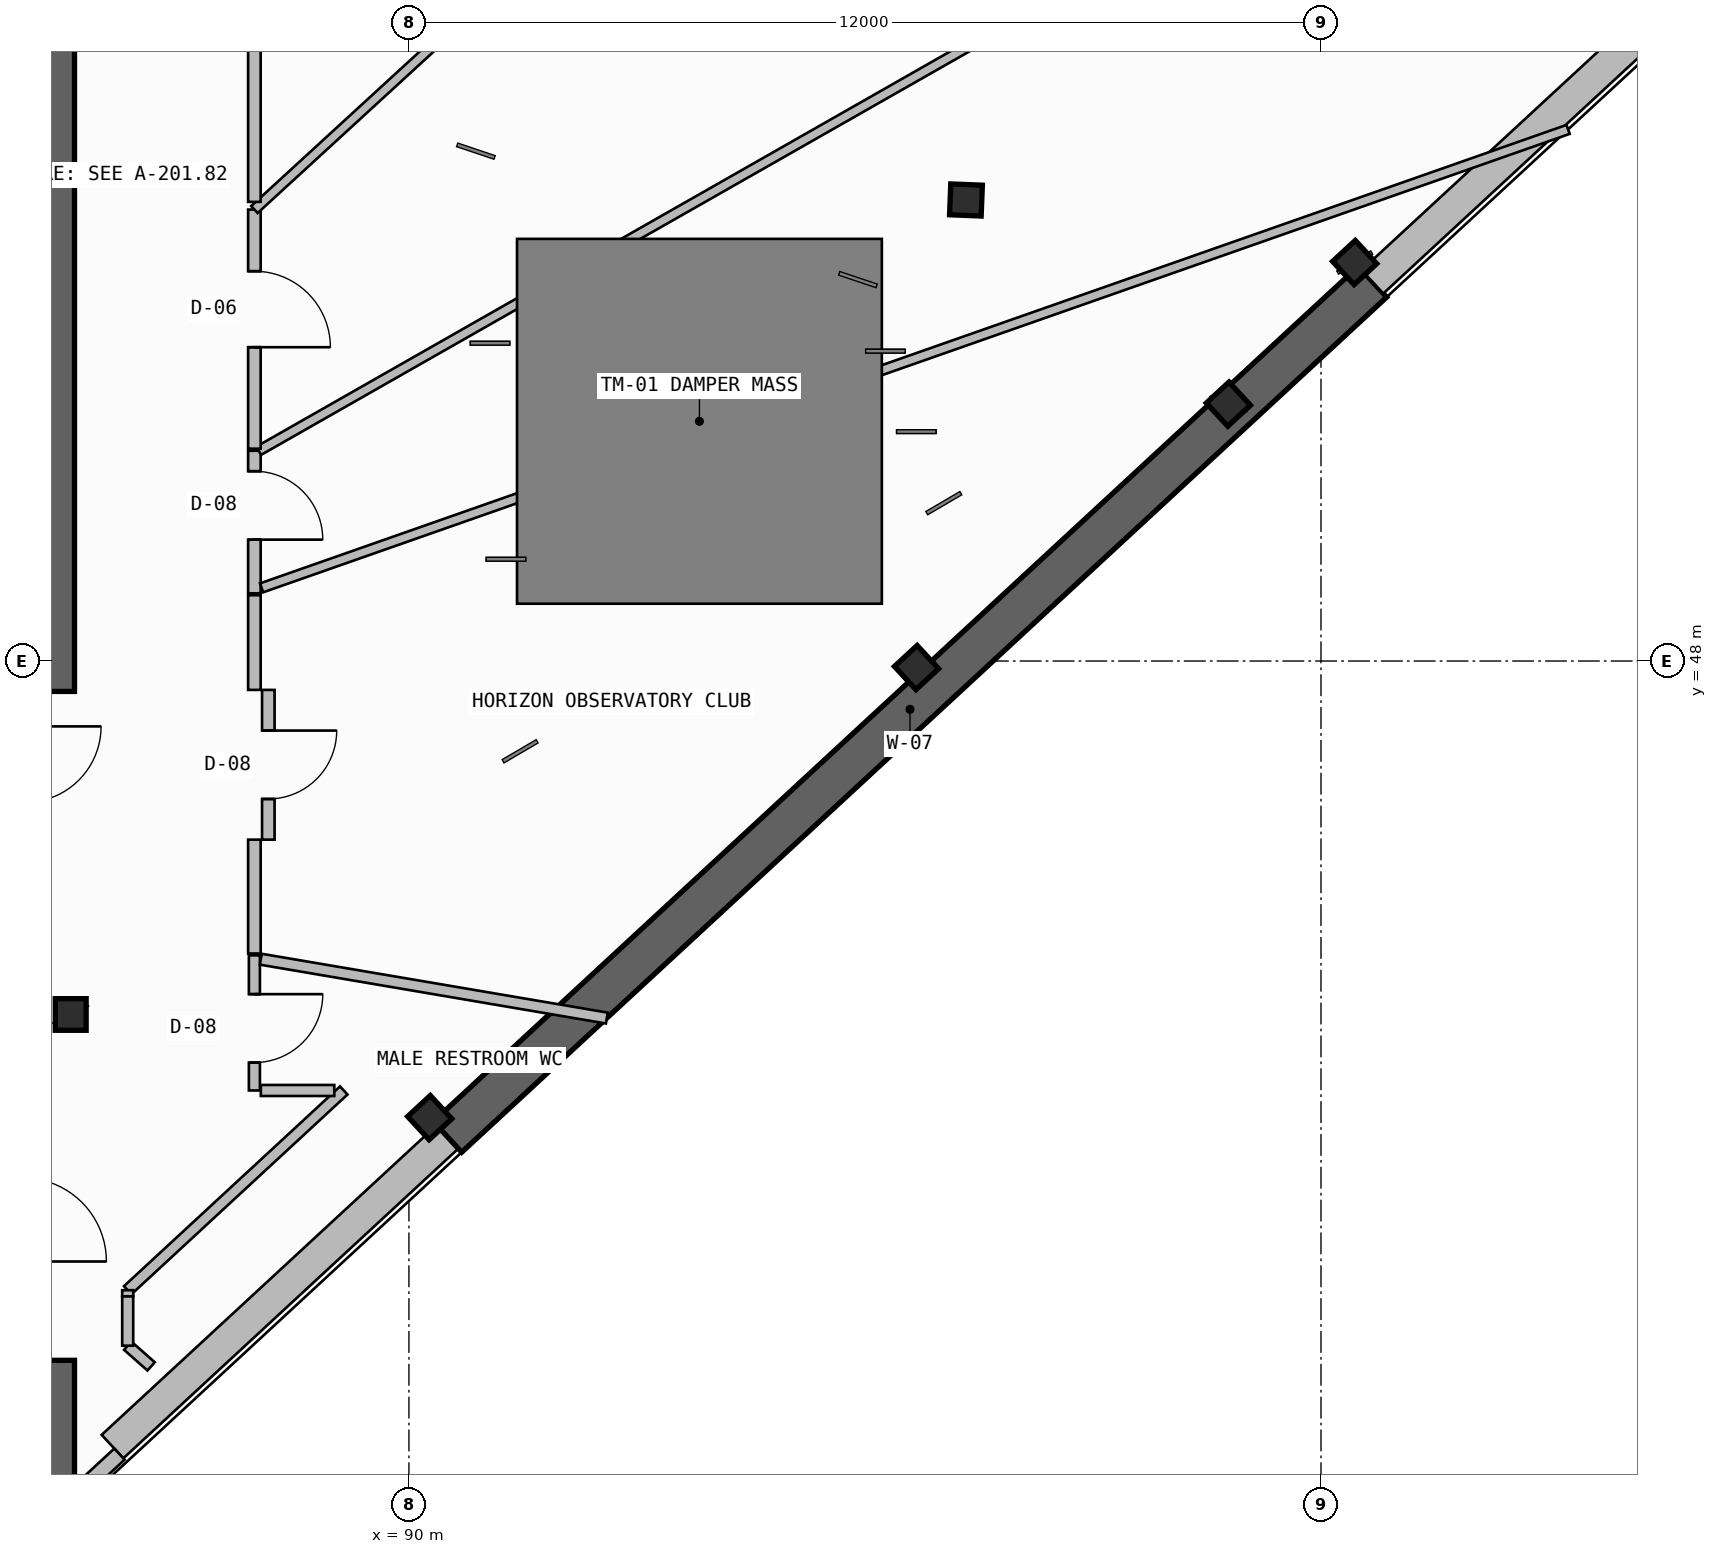
"""IFC4 building model, lengths in metres.
Left out: names, types, materials, properties, quantities, classifications, styles, units other than length and angle.
Written with IfcOpenShell. Run it as: python <this file> out.ifc"""

import sys

from ifc_helpers import new_model, si_unit, direction, frame, frame_2d, origin, origin_2d, place, context, subcontext, project, spatial, rectangle, i_section, extrude, element, fill, save


model = new_model("IFC4")
c1 = context("Model", 3, precision=1e-05, world=origin(), true_north=direction((0.0, 1.0)))
c2 = subcontext(c1, "Body", "Model", "MODEL_VIEW")
j1 = project(units=[si_unit("LENGTHUNIT", "METRE"), si_unit("PLANEANGLEUNIT", "RADIAN")], contexts=[c1])
p1 = place(None, origin())
s1 = spatial("IfcSite", under=j1, at=p1, CompositionType="ELEMENT")
p2 = place(p1, origin())
s2 = spatial("IfcBuilding", under=s1, at=p2, CompositionType="ELEMENT")
p3 = place(p2, frame((0.0, 0.0, 292.42)))
s3 = spatial("IfcBuildingStorey", under=s2, at=p3, CompositionType="ELEMENT", Elevation=292.42)
p4 = place(p3, frame((85.3, 35.5, -0.26), z_axis=(0.0, 0.0, 1.0), x_axis=(0.0, 1.0, 0.0)))
e1 = element("IfcWall", 1, at=p4, inside=s3, PredefinedType="SHEAR", context=c2, shape_type="SweptSolid", body=[
    extrude(rectangle(XDim=3.3, YDim=0.6, at=frame_2d((1.65, 0.0))), origin(), (0.0, 0.0, 1.0), 5.82),
])
p5 = place(p3, frame((85.3, 47.6, -0.26), z_axis=(0.0, 0.0, 1.0), x_axis=(0.0, 1.0, 0.0)))
e2 = element("IfcWall", 2, at=p5, inside=s3, PredefinedType="SHEAR", context=c2, shape_type="SweptSolid", body=[
    extrude(rectangle(XDim=8.45, YDim=0.6, at=frame_2d((4.225, 0.0))), origin(), (0.0, 0.0, 1.0), 5.82),
])
for number, where, z_axis, x_axis in (
    (3, (85.55, 43.35, 0.0), (0.0, 0.0, 1.0), (1.0, 0.0, 0.0)),
    (4, (90.273, 41.993, 0.0), (0.0, 0.0, 1.0), (0.734, 0.679, 0.0)),
    (5, (96.679, 47.914, 0.0), (0.0, 0.0, 1.0), (0.734, 0.679, 0.0)),
    (6, (102.443, 53.242, 0.0), (0.0, 0.0, 1.0), (0.734, 0.679, 0.0)),
    (7, (100.782, 51.38, 0.0), (0.0, 0.0, 1.0), (0.734, 0.679, 0.0)),
    (8, (97.329, 54.065, 0.0), (0.0, 0.0, 1.0), (0.039, 0.999, 0.0)),
):
    element("IfcColumn", number, at=place(p3, frame(where, z_axis=z_axis, x_axis=x_axis)), inside=s3, PredefinedType="COLUMN", context=c2, shape_type="SweptSolid", body=[
        extrude(i_section(OverallWidth=0.406, OverallDepth=0.416, WebThickness=0.03, FlangeThickness=0.048, FilletRadius=0.015, at=origin_2d()), origin(), (0.0, 0.0, 1.0), 5.76),
    ])
p6 = place(p3, frame((86.1, 37.665, 0.0), z_axis=(0.0, 0.0, 1.0), x_axis=(0.734321413343, 0.678801931277, 0.0)))
e9 = element("IfcWall", 9, at=p6, inside=s3, PredefinedType="SOLIDWALL", context=c2, shape_type="SweptSolid", body=[
    extrude(rectangle(XDim=6.002, YDim=0.42, at=frame_2d((3.001, 0.0))), origin(), (0.0, 0.0, 1.0), 4.545),
])
p7 = place(p3, frame((90.508, 41.74, -0.26), z_axis=(0.0, 0.0, 1.0), x_axis=(0.734315848115, 0.678807951638, 0.0)))
e10 = element("IfcWall", 10, at=p7, inside=s3, PredefinedType="SHEAR", context=c2, shape_type="SweptSolid", body=[
    extrude(rectangle(XDim=16.573, YDim=0.55, at=frame_2d((8.286, 0.0))), origin(), (0.0, 0.0, 1.0), 5.82),
])
p8 = place(p3, frame((102.677, 52.989, 0.0), z_axis=(0.0, 0.0, 1.0), x_axis=(0.734331107219, 0.678791444386, 0.0)))
e11 = element("IfcWall", 11, at=p8, inside=s3, PredefinedType="SOLIDWALL", context=c2, shape_type="SweptSolid", body=[
    extrude(rectangle(XDim=12.211, YDim=0.42, at=frame_2d((6.106, 0.0))), origin(), (0.0, 0.0, 1.0), 2.195),
])
p9 = place(p3, frame((86.192, 37.566, 0.0), z_axis=(0.0, 0.0, 1.0), x_axis=(-0.734346728958, -0.678774544064, 0.0)))
e12 = element("IfcWall", 12, at=p9, inside=s3, PredefinedType="PARAPET", context=c2, shape_type="SweptSolid", body=[
    extrude(rectangle(XDim=0.615, YDim=0.2, at=frame_2d((0.308, 0.0))), origin(), (0.0, 0.0, 1.0), 1.15),
])
p10 = place(p3, frame((86.3, 39.722, 0.0), z_axis=(0.0, 0.0, 1.0), x_axis=(0.734312402088, 0.678811679436, 0.0)))
e13 = element("IfcWall", 13, at=p10, inside=s3, PredefinedType="PARTITIONING", context=c2, shape_type="SweptSolid", body=[
    extrude(rectangle(XDim=3.871, YDim=0.145, at=frame_2d((1.936, 0.0))), origin(), (0.0, 0.0, 1.0), 5.045),
])
p11 = place(p3, frame((87.967, 42.35, 0.0), z_axis=(0.0, 0.0, 1.0), x_axis=(0.0, 1.0, 0.0)))
e14 = element("IfcWall", 14, at=p11, inside=s3, PredefinedType="PARTITIONING", context=c2, shape_type="SweptSolid", body=[
    extrude(rectangle(XDim=1.778, YDim=0.145, at=frame_2d((0.889, 0.0))), origin(), (0.0, 0.0, 1.0), 5.045),
])
p12 = place(p11, frame((0.367, 0.0, 0.0)))
e15 = element("IfcOpeningElement", 15, at=p12, cuts=e14, PredefinedType="OPENING", context=c2, shape_type="SweptSolid", body=[
    extrude(rectangle(XDim=0.9, YDim=2.1, at=frame_2d((0.45, 1.05))), frame((0.0, 0.083, 0.0), z_axis=(0.0, -1.0, 0.0), x_axis=(1.0, 0.0, 0.0)), (0.0, 0.0, 1.0), 0.165),
])
p13 = place(p3, frame((89.018, 42.35, 0.0), z_axis=(0.0, 0.0, 1.0), x_axis=(-1.0, 0.0, 0.0)))
e16 = element("IfcWall", 16, at=p13, inside=s3, PredefinedType="PARTITIONING", context=c2, shape_type="SweptSolid", body=[
    extrude(rectangle(XDim=0.967, YDim=0.145, at=frame_2d((0.483, 0.0))), origin(), (0.0, 0.0, 1.0), 5.045),
])
p14 = place(p3, frame((86.3, 39.641, 0.0), z_axis=(0.0, 0.0, 1.0), x_axis=(0.0, 1.0, 0.0)))
e17 = element("IfcWall", 17, at=p14, inside=s3, PredefinedType="PARTITIONING", context=c2, shape_type="SweptSolid", body=[
    extrude(rectangle(XDim=0.082, YDim=0.145, at=frame_2d((0.041, 0.0))), origin(), (0.0, 0.0, 1.0), 5.56),
])
p15 = place(p3, frame((88.051, 44.077, 0.0), z_axis=(0.0, 0.0, 1.0), x_axis=(0.985838283524, -0.167698773815, 0.0)))
e18 = element("IfcWall", 18, at=p15, inside=s3, PredefinedType="PARTITIONING", context=c2, shape_type="SweptSolid", body=[
    extrude(rectangle(XDim=4.618, YDim=0.145, at=frame_2d((2.309, 0.0))), origin(), (0.0, 0.0, 1.0), 4.545),
])
p16 = place(p3, frame((87.967, 48.891, 0.0), z_axis=(0.0, 0.0, 1.0), x_axis=(0.0, 1.0, 0.0)))
e19 = element("IfcWall", 19, at=p16, inside=s3, PredefinedType="PARTITIONING", context=c2, shape_type="SweptSolid", body=[
    extrude(rectangle(XDim=1.875, YDim=0.165, at=frame_2d((0.938, 0.0))), origin(), (0.0, 0.0, 1.0), 5.56),
])
p17 = place(p16, frame((0.706, 0.0, 0.0)))
e20 = element("IfcOpeningElement", 20, at=p17, cuts=e19, PredefinedType="OPENING", context=c2, shape_type="SweptSolid", body=[
    extrude(rectangle(XDim=0.9, YDim=2.1, at=frame_2d((0.45, 1.05))), frame((0.0, 0.093, 0.0), z_axis=(0.0, -1.0, 0.0), x_axis=(1.0, 0.0, 0.0)), (0.0, 0.0, 1.0), 0.185),
])
p18 = place(p3, frame((105.252, 54.994, 0.0), z_axis=(0.0, 0.0, 1.0), x_axis=(-0.943604021882, -0.33107619952, 0.0)))
e21 = element("IfcWall", 21, at=p18, inside=s3, PredefinedType="PARTITIONING", context=c2, shape_type="SweptSolid", body=[
    extrude(rectangle(XDim=18.218, YDim=0.125, at=frame_2d((9.109, 0.0))), origin(), (0.0, 0.0, 1.0), 2.195),
])
p19 = place(p3, frame((88.024, 50.766, 0.0), z_axis=(0.0, 0.0, 1.0), x_axis=(0.868931723382, 0.494931975226, 0.0)))
e22 = element("IfcWall", 22, at=p19, inside=s3, PredefinedType="PARTITIONING", context=c2, shape_type="SweptSolid", body=[
    extrude(rectangle(XDim=27.262, YDim=0.125, at=frame_2d((13.631, 0.0))), origin(), (0.0, 0.0, 1.0), 2.195),
])
p20 = place(p3, frame((88.15, 45.65, 0.0), z_axis=(0.0, 0.0, 1.0), x_axis=(0.0, 1.0, 0.0)))
e23 = element("IfcWall", 23, at=p20, inside=s3, PredefinedType="PARTITIONING", context=c2, shape_type="SweptSolid", body=[
    extrude(rectangle(XDim=1.97, YDim=0.165, at=frame_2d((0.985, 0.0))), origin(), (0.0, 0.0, 1.0), 5.56),
])
p21 = place(p20, frame((0.535, 0.0, 0.0)))
e24 = element("IfcOpeningElement", 24, at=p21, cuts=e23, PredefinedType="OPENING", context=c2, shape_type="SweptSolid", body=[
    extrude(rectangle(XDim=0.9, YDim=2.1, at=frame_2d((0.45, 1.05))), frame((0.0, 0.093, 0.0), z_axis=(0.0, -1.0, 0.0), x_axis=(1.0, 0.0, 0.0)), (0.0, 0.0, 1.0), 0.185),
])
p22 = place(p3, frame((87.967, 44.152, 0.0), z_axis=(0.0, 0.0, 1.0), x_axis=(0.0, 1.0, 0.0)))
e25 = element("IfcWall", 25, at=p22, inside=s3, PredefinedType="PARTITIONING", context=c2, shape_type="SweptSolid", body=[
    extrude(rectangle(XDim=1.498, YDim=0.165, at=frame_2d((0.749, 0.0))), origin(), (0.0, 0.0, 1.0), 2.195),
])
p23 = place(p3, frame((87.967, 47.62, 0.0), z_axis=(0.0, 0.0, 1.0), x_axis=(0.0, 1.0, 0.0)))
e26 = element("IfcWall", 26, at=p23, inside=s3, PredefinedType="PARTITIONING", context=c2, shape_type="SweptSolid", body=[
    extrude(rectangle(XDim=1.246, YDim=0.165, at=frame_2d((0.623, 0.0))), origin(), (0.0, 0.0, 1.0), 5.56),
])
p24 = place(p3, frame((87.967, 50.793, 0.0), z_axis=(0.0, 0.0, 1.0), x_axis=(0.0, 1.0, 0.0)))
e27 = element("IfcWall", 27, at=p24, inside=s3, PredefinedType="PARTITIONING", context=c2, shape_type="SweptSolid", body=[
    extrude(rectangle(XDim=3.146, YDim=0.165, at=frame_2d((1.573, 0.0))), origin(), (0.0, 0.0, 1.0), 5.56),
])
p25 = place(p24, frame((1.335, 0.0, 0.0)))
e28 = element("IfcOpeningElement", 28, at=p25, cuts=e27, PredefinedType="OPENING", context=c2, shape_type="SweptSolid", body=[
    extrude(rectangle(XDim=1.0, YDim=2.2, at=frame_2d((0.5, 1.1))), frame((0.0, 0.093, 0.0), z_axis=(0.0, -1.0, 0.0), x_axis=(1.0, 0.0, 0.0)), (0.0, 0.0, 1.0), 0.185),
])
p26 = place(p3, frame((87.967, 53.939, 0.0), z_axis=(0.0, 0.0, 1.0), x_axis=(0.737044386096, 0.675844340751, 0.0)))
e29 = element("IfcWall", 29, at=p26, inside=s3, PredefinedType="PARTITIONING", context=c2, shape_type="SweptSolid", body=[
    extrude(rectangle(XDim=14.959, YDim=0.125, at=frame_2d((7.48, 0.0))), origin(), (0.0, 0.0, 1.0), 2.195),
])
p27 = place(p3, frame((87.967, 54.041, 0.0), z_axis=(0.0, 0.0, 1.0), x_axis=(0.0, 1.0, 0.0)))
e30 = element("IfcWall", 30, at=p27, inside=s3, PredefinedType="PARTITIONING", context=c2, shape_type="SweptSolid", body=[
    extrude(rectangle(XDim=4.826, YDim=0.165, at=frame_2d((2.413, 0.0))), origin(), (0.0, 0.0, 1.0), 2.195),
])
p28 = place(p27, frame((2.492, 0.0, 0.0)))
e31 = element("IfcOpeningElement", 31, at=p28, cuts=e30, PredefinedType="OPENING", context=c2, shape_type="SweptSolid", body=[
    extrude(rectangle(XDim=0.9, YDim=2.1, at=frame_2d((0.45, 1.05))), frame((0.0, 0.093, 0.0), z_axis=(0.0, -1.0, 0.0), x_axis=(1.0, 0.0, 0.0)), (0.0, 0.0, 1.0), 0.185),
])
p29 = place(p3, frame((86.608, 38.72, 0.0), z_axis=(0.0, 0.0, 1.0), x_axis=(-0.749438807103, 0.66207361706, 0.0)))
e32 = element("IfcWall", 32, at=p29, inside=s3, PredefinedType="PARTITIONING", context=c2, shape_type="SweptSolid", body=[
    extrude(rectangle(XDim=0.411, YDim=0.145, at=frame_2d((0.206, 0.0))), origin(), (0.0, 0.0, 1.0), 5.56),
])
p30 = place(p3, frame((86.3, 38.992, 0.0), z_axis=(0.0, 0.0, 1.0), x_axis=(0.0, 1.0, 0.0)))
e33 = element("IfcWall", 33, at=p30, inside=s3, PredefinedType="PARTITIONING", context=c2, shape_type="SweptSolid", body=[
    extrude(rectangle(XDim=0.648, YDim=0.145, at=frame_2d((0.324, 0.0))), origin(), (0.0, 0.0, 1.0), 5.56),
])
p31 = place(p12, frame((0.9, 0.0, 0.0), z_axis=(0.0, 0.0, 1.0), x_axis=(-1.0, 0.0, 0.0)))
e34 = element("IfcDoor", 34, at=p31, inside=s3, OperationType="SINGLE_SWING_LEFT", PredefinedType="DOOR", context=c2, shape_type="SweptSolid", body=[
    extrude(rectangle(XDim=0.9, YDim=2.1, at=frame_2d((0.45, 1.05))), frame((0.0, 0.025, 0.0), z_axis=(0.0, -1.0, 0.0), x_axis=(1.0, 0.0, 0.0)), (0.0, 0.0, 1.0), 0.05),
])
fill(e15, e34)
p32 = place(p17, frame((0.9, 0.0, 0.0), z_axis=(0.0, 0.0, 1.0), x_axis=(-1.0, 0.0, 0.0)))
e35 = element("IfcDoor", 35, at=p32, inside=s3, OperationType="SINGLE_SWING_RIGHT", PredefinedType="DOOR", context=c2, shape_type="SweptSolid", body=[
    extrude(rectangle(XDim=0.9, YDim=2.1, at=frame_2d((0.45, 1.05))), frame((0.0, 0.025, 0.0), z_axis=(0.0, -1.0, 0.0), x_axis=(1.0, 0.0, 0.0)), (0.0, 0.0, 1.0), 0.05),
])
fill(e20, e35)
p33 = place(p21, frame((0.9, 0.0, 0.0), z_axis=(0.0, 0.0, 1.0), x_axis=(-1.0, 0.0, 0.0)))
e36 = element("IfcDoor", 36, at=p33, inside=s3, OperationType="SINGLE_SWING_LEFT", PredefinedType="DOOR", context=c2, shape_type="SweptSolid", body=[
    extrude(rectangle(XDim=0.9, YDim=2.1, at=frame_2d((0.45, 1.05))), frame((0.0, 0.025, 0.0), z_axis=(0.0, -1.0, 0.0), x_axis=(1.0, 0.0, 0.0)), (0.0, 0.0, 1.0), 0.05),
])
fill(e24, e36)
p34 = place(p25, frame((1.0, 0.0, 0.0), z_axis=(0.0, 0.0, 1.0), x_axis=(-1.0, 0.0, 0.0)))
e37 = element("IfcDoor", 37, at=p34, inside=s3, OperationType="SINGLE_SWING_RIGHT", PredefinedType="DOOR", context=c2, shape_type="SweptSolid", body=[
    extrude(rectangle(XDim=1.0, YDim=2.2, at=frame_2d((0.5, 1.1))), frame((0.0, 0.025, 0.0), z_axis=(0.0, -1.0, 0.0), x_axis=(1.0, 0.0, 0.0)), (0.0, 0.0, 1.0), 0.05),
])
fill(e28, e37)
save(model, sys.argv[1])
